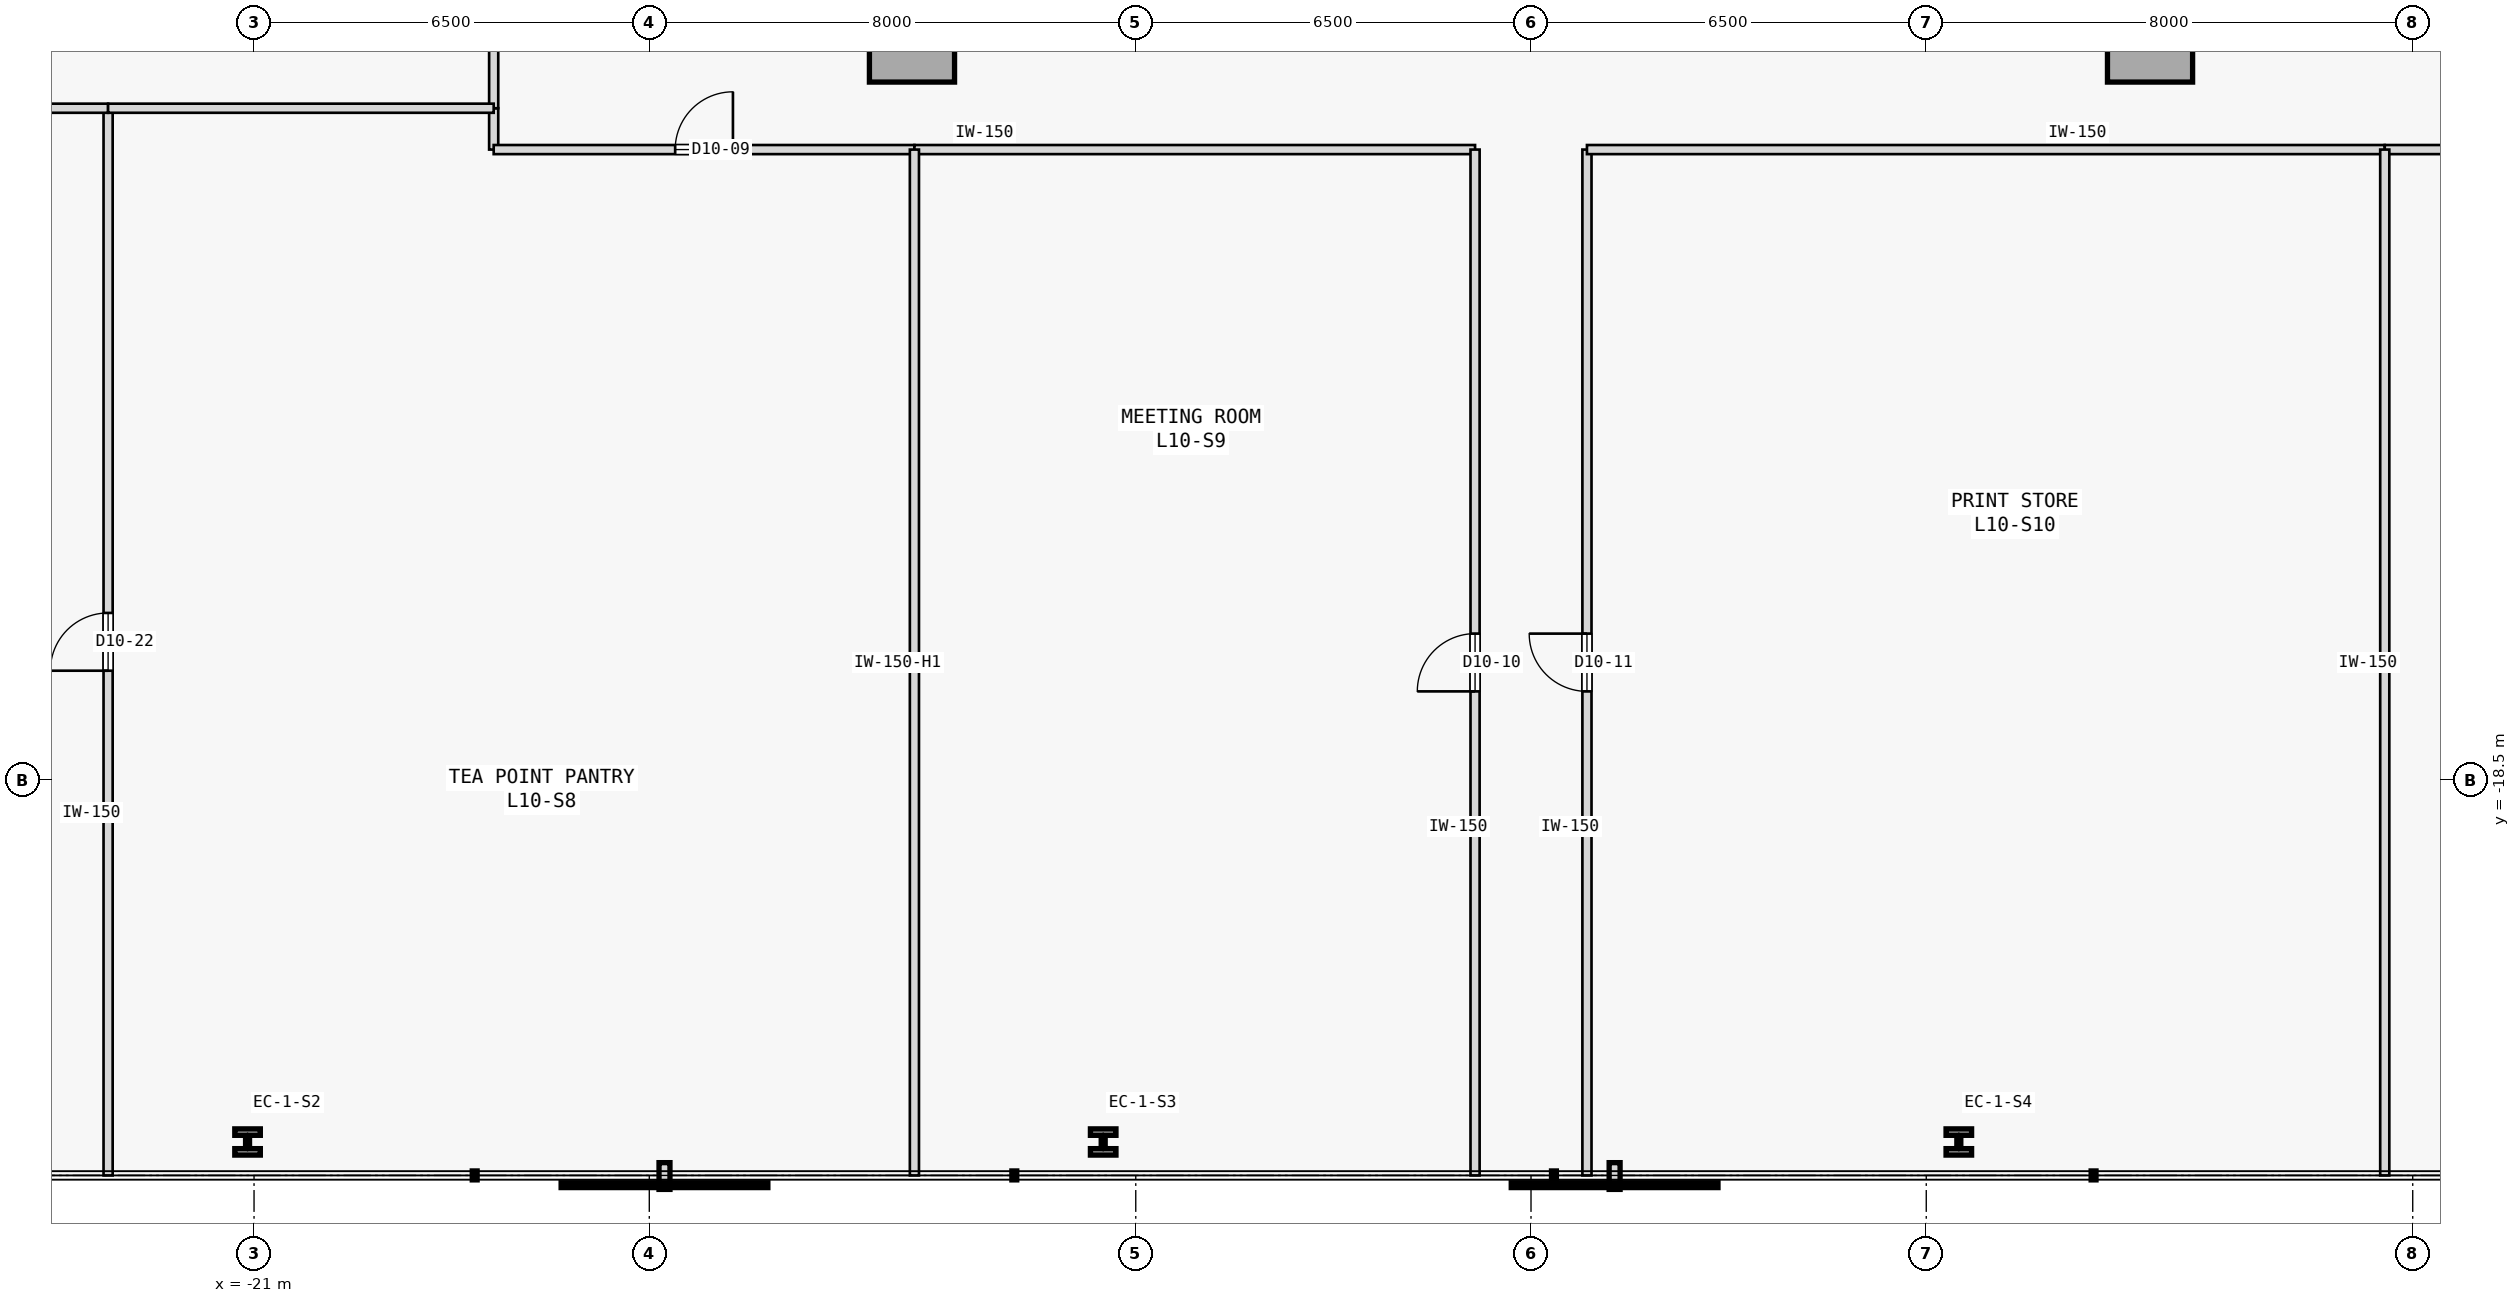
"""IFC4 building model, lengths in metres.
Left out: names, types, materials, properties, quantities, classifications, styles, units other than length and angle.
Written with IfcOpenShell. Run it as: python <this file> out.ifc"""

import sys

from ifc_helpers import new_model, si_unit, direction, frame, frame_2d, origin, origin_2d, place, context, subcontext, project, spatial, rectangle, i_section, extrude, element, fill, save


model = new_model("IFC4")
c1 = context("Model", 3, precision=1e-05, world=origin(), true_north=direction((0.0, 1.0)))
c2 = subcontext(c1, "Body", "Model", "MODEL_VIEW")
j1 = project(units=[si_unit("LENGTHUNIT", "METRE"), si_unit("PLANEANGLEUNIT", "RADIAN")], contexts=[c1])
p1 = place(None, origin())
s1 = spatial("IfcSite", under=j1, at=p1, CompositionType="ELEMENT")
p2 = place(p1, origin())
s2 = spatial("IfcBuilding", under=s1, at=p2, CompositionType="ELEMENT")
p3 = place(p2, frame((0.0, 0.0, 44.6)))
s3 = spatial("IfcBuildingStorey", under=s2, at=p3, CompositionType="ELEMENT", Elevation=44.6)
for number, where, z_axis, x_axis in (
    (1, (-10.18, -6.32, 0.0), (0.0, 0.0, 1.0), (1.0, 0.0, 0.0)),
    (2, (10.18, -6.32, 0.0), (0.0, 0.0, 1.0), (1.0, 0.0, 0.0)),
):
    element("IfcColumn", number, at=place(p3, frame(where, z_axis=z_axis, x_axis=x_axis)), inside=s3, PredefinedType="COLUMN", context=c2, shape_type="SweptSolid", body=[
        extrude(rectangle(XDim=1.4, YDim=1.4, at=origin_2d()), origin(), (0.0, 0.0, 1.0), 3.8),
    ])
for number, where, z_axis, x_axis in (
    (3, (-21.107, -24.45, 0.0), (0.0, 0.0, 1.0), (1.0, 0.0, 0.0)),
    (4, (-7.036, -24.45, 0.0), (0.0, 0.0, 1.0), (1.0, 0.0, 0.0)),
    (5, (7.036, -24.45, 0.0), (0.0, 0.0, 1.0), (1.0, 0.0, 0.0)),
):
    element("IfcColumn", number, at=place(p3, frame(where, z_axis=z_axis, x_axis=x_axis)), inside=s3, PredefinedType="COLUMN", context=c2, shape_type="SweptSolid", body=[
        extrude(i_section(OverallWidth=0.42, OverallDepth=0.431, WebThickness=0.065, FlangeThickness=0.106, FilletRadius=0.015, at=origin_2d()), origin(), (0.0, 0.0, 1.0), 3.8),
    ])
p4 = place(p3, frame((-17.059, -8.13, 0.0), z_axis=(0.0, 0.0, 1.0), x_axis=(0.0, 1.0, 0.0)))
e6 = element("IfcWall", 6, at=p4, inside=s3, PredefinedType="PARTITIONING", context=c2, shape_type="SweptSolid", body=[
    extrude(rectangle(XDim=0.68, YDim=0.15, at=frame_2d((0.34, 0.0))), origin(), (0.0, 0.0, 1.0), 3.575),
])
p5 = place(p3, frame((-17.059, -8.13, 0.0), z_axis=(0.0, 0.0, 1.0), x_axis=(1.0, 0.0, 0.0)))
e7 = element("IfcWall", 7, at=p5, inside=s3, PredefinedType="PARTITIONING", context=c2, shape_type="SweptSolid", body=[
    extrude(rectangle(XDim=6.919, YDim=0.15, at=frame_2d((3.459, 0.0))), origin(), (0.0, 0.0, 1.0), 3.575),
])
p6 = place(p5, frame((2.985, 0.0, 0.0)))
e8 = element("IfcOpeningElement", 8, at=p6, cuts=e7, PredefinedType="OPENING", context=c2, shape_type="SweptSolid", body=[
    extrude(rectangle(XDim=0.95, YDim=2.15, at=frame_2d((0.475, 1.075))), frame((0.0, 0.085, 0.0), z_axis=(0.0, -1.0, 0.0), x_axis=(1.0, 0.0, 0.0)), (0.0, 0.0, 1.0), 0.17),
])
p7 = place(p3, frame((-10.14, -8.13, 0.0), z_axis=(0.0, 0.0, 1.0), x_axis=(1.0, 0.0, 0.0)))
e9 = element("IfcWall", 9, at=p7, inside=s3, PredefinedType="PARTITIONING", context=c2, shape_type="SweptSolid", body=[
    extrude(rectangle(XDim=9.22, YDim=0.15, at=frame_2d((4.61, 0.0))), origin(), (0.0, 0.0, 1.0), 3.575),
])
p8 = place(p3, frame((-0.92, -25.0, 0.0), z_axis=(0.0, 0.0, 1.0), x_axis=(0.0, 1.0, 0.0)))
e10 = element("IfcWall", 10, at=p8, inside=s3, PredefinedType="PARTITIONING", context=c2, shape_type="SweptSolid", body=[
    extrude(rectangle(XDim=16.87, YDim=0.15, at=frame_2d((8.435, 0.0))), origin(), (0.0, 0.0, 1.0), 3.575),
])
p9 = place(p8, frame((7.96, 0.0, 0.0)))
e11 = element("IfcOpeningElement", 11, at=p9, cuts=e10, PredefinedType="OPENING", context=c2, shape_type="SweptSolid", body=[
    extrude(rectangle(XDim=0.95, YDim=2.15, at=frame_2d((0.475, 1.075))), frame((0.0, 0.085, 0.0), z_axis=(0.0, -1.0, 0.0), x_axis=(1.0, 0.0, 0.0)), (0.0, 0.0, 1.0), 0.17),
])
p10 = place(p3, frame((0.92, -25.0, 0.0), z_axis=(0.0, 0.0, 1.0), x_axis=(0.0, 1.0, 0.0)))
e12 = element("IfcWall", 12, at=p10, inside=s3, PredefinedType="PARTITIONING", context=c2, shape_type="SweptSolid", body=[
    extrude(rectangle(XDim=16.87, YDim=0.15, at=frame_2d((8.435, 0.0))), origin(), (0.0, 0.0, 1.0), 3.575),
])
p11 = place(p10, frame((7.96, 0.0, 0.0)))
e13 = element("IfcOpeningElement", 13, at=p11, cuts=e12, PredefinedType="OPENING", context=c2, shape_type="SweptSolid", body=[
    extrude(rectangle(XDim=0.95, YDim=2.15, at=frame_2d((0.475, 1.075))), frame((0.0, 0.085, 0.0), z_axis=(0.0, -1.0, 0.0), x_axis=(1.0, 0.0, 0.0)), (0.0, 0.0, 1.0), 0.17),
])
p12 = place(p3, frame((0.92, -8.13, 0.0), z_axis=(0.0, 0.0, 1.0), x_axis=(1.0, 0.0, 0.0)))
e14 = element("IfcWall", 14, at=p12, inside=s3, PredefinedType="PARTITIONING", context=c2, shape_type="SweptSolid", body=[
    extrude(rectangle(XDim=13.12, YDim=0.15, at=frame_2d((6.56, 0.0))), origin(), (0.0, 0.0, 1.0), 3.575),
])
p13 = place(p3, frame((14.04, -8.13, 0.0), z_axis=(0.0, 0.0, 1.0), x_axis=(1.0, 0.0, 0.0)))
e15 = element("IfcWall", 15, at=p13, inside=s3, PredefinedType="PARTITIONING", context=c2, shape_type="SweptSolid", body=[
    extrude(rectangle(XDim=3.019, YDim=0.15, at=frame_2d((1.51, 0.0))), origin(), (0.0, 0.0, 1.0), 3.575),
])
p14 = place(p13, frame((1.034, 0.0, 0.0)))
e16 = element("IfcOpeningElement", 16, at=p14, cuts=e15, PredefinedType="OPENING", context=c2, shape_type="SweptSolid", body=[
    extrude(rectangle(XDim=0.95, YDim=2.15, at=frame_2d((0.475, 1.075))), frame((0.0, 0.085, 0.0), z_axis=(0.0, -1.0, 0.0), x_axis=(1.0, 0.0, 0.0)), (0.0, 0.0, 1.0), 0.17),
])
p15 = place(p3, frame((-17.059, -7.45, 0.0), z_axis=(0.0, 0.0, 1.0), x_axis=(0.0, 1.0, 0.0)))
e17 = element("IfcWall", 17, at=p15, inside=s3, PredefinedType="PARTITIONING", context=c2, shape_type="SweptSolid", body=[
    extrude(rectangle(XDim=3.129, YDim=0.15, at=frame_2d((1.564, 0.0))), origin(), (0.0, 0.0, 1.0), 3.575),
])
p16 = place(p15, frame((1.09, 0.0, 0.0)))
e18 = element("IfcOpeningElement", 18, at=p16, cuts=e17, PredefinedType="OPENING", context=c2, shape_type="SweptSolid", body=[
    extrude(rectangle(XDim=0.95, YDim=2.15, at=frame_2d((0.475, 1.075))), frame((0.0, 0.085, 0.0), z_axis=(0.0, -1.0, 0.0), x_axis=(1.0, 0.0, 0.0)), (0.0, 0.0, 1.0), 0.17),
])
p17 = place(p3, frame((-23.4, -25.0, 0.0), z_axis=(0.0, 0.0, 1.0), x_axis=(0.0, 1.0, 0.0)))
e19 = element("IfcWall", 19, at=p17, inside=s3, PredefinedType="PARTITIONING", context=c2, shape_type="SweptSolid", body=[
    extrude(rectangle(XDim=17.55, YDim=0.15, at=frame_2d((8.775, 0.0))), origin(), (0.0, 0.0, 1.0), 3.575),
])
p18 = place(p17, frame((8.3, 0.0, 0.0)))
e20 = element("IfcOpeningElement", 20, at=p18, cuts=e19, PredefinedType="OPENING", context=c2, shape_type="SweptSolid", body=[
    extrude(rectangle(XDim=0.95, YDim=2.15, at=frame_2d((0.475, 1.075))), frame((0.0, 0.085, 0.0), z_axis=(0.0, -1.0, 0.0), x_axis=(1.0, 0.0, 0.0)), (0.0, 0.0, 1.0), 0.17),
])
p19 = place(p3, frame((-39.0, -7.45, 0.0), z_axis=(0.0, 0.0, 1.0), x_axis=(1.0, 0.0, 0.0)))
e21 = element("IfcWall", 21, at=p19, inside=s3, PredefinedType="PARTITIONING", context=c2, shape_type="SweptSolid", body=[
    extrude(rectangle(XDim=15.6, YDim=0.15, at=frame_2d((7.8, 0.0))), origin(), (0.0, 0.0, 1.0), 3.575),
])
p20 = place(p3, frame((-10.14, -25.0, 0.0), z_axis=(0.0, 0.0, 1.0), x_axis=(0.0, 1.0, 0.0)))
e22 = element("IfcWall", 22, at=p20, inside=s3, PredefinedType="PARTITIONING", context=c2, shape_type="SweptSolid", body=[
    extrude(rectangle(XDim=16.87, YDim=0.15, at=frame_2d((8.435, 0.0))), origin(), (0.0, 0.0, 1.0), 3.125),
])
p21 = place(p3, frame((-23.4, -7.45, 0.0), z_axis=(0.0, 0.0, 1.0), x_axis=(1.0, 0.0, 0.0)))
e23 = element("IfcWall", 23, at=p21, inside=s3, PredefinedType="PARTITIONING", context=c2, shape_type="SweptSolid", body=[
    extrude(rectangle(XDim=6.341, YDim=0.15, at=frame_2d((3.17, 0.0))), origin(), (0.0, 0.0, 1.0), 3.575),
])
p22 = place(p3, frame((14.04, -25.0, 0.0), z_axis=(0.0, 0.0, 1.0), x_axis=(0.0, 1.0, 0.0)))
e24 = element("IfcWall", 24, at=p22, inside=s3, PredefinedType="PARTITIONING", context=c2, shape_type="SweptSolid", body=[
    extrude(rectangle(XDim=16.87, YDim=0.15, at=frame_2d((8.435, 0.0))), origin(), (0.0, 0.0, 1.0), 3.575),
])
p23 = place(p6, origin())
e25 = element("IfcDoor", 25, at=p23, inside=s3, OperationType="SINGLE_SWING_RIGHT", PredefinedType="DOOR", context=c2, shape_type="SweptSolid", body=[
    extrude(rectangle(XDim=0.95, YDim=2.15, at=frame_2d((0.475, 1.075))), frame((0.0, 0.025, 0.0), z_axis=(0.0, -1.0, 0.0), x_axis=(1.0, 0.0, 0.0)), (0.0, 0.0, 1.0), 0.05),
])
fill(e8, e25)
p24 = place(p9, origin())
e26 = element("IfcDoor", 26, at=p24, inside=s3, OperationType="SINGLE_SWING_LEFT", PredefinedType="DOOR", context=c2, shape_type="SweptSolid", body=[
    extrude(rectangle(XDim=0.95, YDim=2.15, at=frame_2d((0.475, 1.075))), frame((0.0, 0.025, 0.0), z_axis=(0.0, -1.0, 0.0), x_axis=(1.0, 0.0, 0.0)), (0.0, 0.0, 1.0), 0.05),
])
fill(e11, e26)
p25 = place(p11, origin())
e27 = element("IfcDoor", 27, at=p25, inside=s3, OperationType="SINGLE_SWING_RIGHT", PredefinedType="DOOR", context=c2, shape_type="SweptSolid", body=[
    extrude(rectangle(XDim=0.95, YDim=2.15, at=frame_2d((0.475, 1.075))), frame((0.0, 0.025, 0.0), z_axis=(0.0, -1.0, 0.0), x_axis=(1.0, 0.0, 0.0)), (0.0, 0.0, 1.0), 0.05),
])
fill(e13, e27)
p26 = place(p18, origin())
e28 = element("IfcDoor", 28, at=p26, inside=s3, OperationType="SINGLE_SWING_LEFT", PredefinedType="DOOR", context=c2, shape_type="SweptSolid", body=[
    extrude(rectangle(XDim=0.95, YDim=2.15, at=frame_2d((0.475, 1.075))), frame((0.0, 0.025, 0.0), z_axis=(0.0, -1.0, 0.0), x_axis=(1.0, 0.0, 0.0)), (0.0, 0.0, 1.0), 0.05),
])
fill(e20, e28)
save(model, sys.argv[1])
